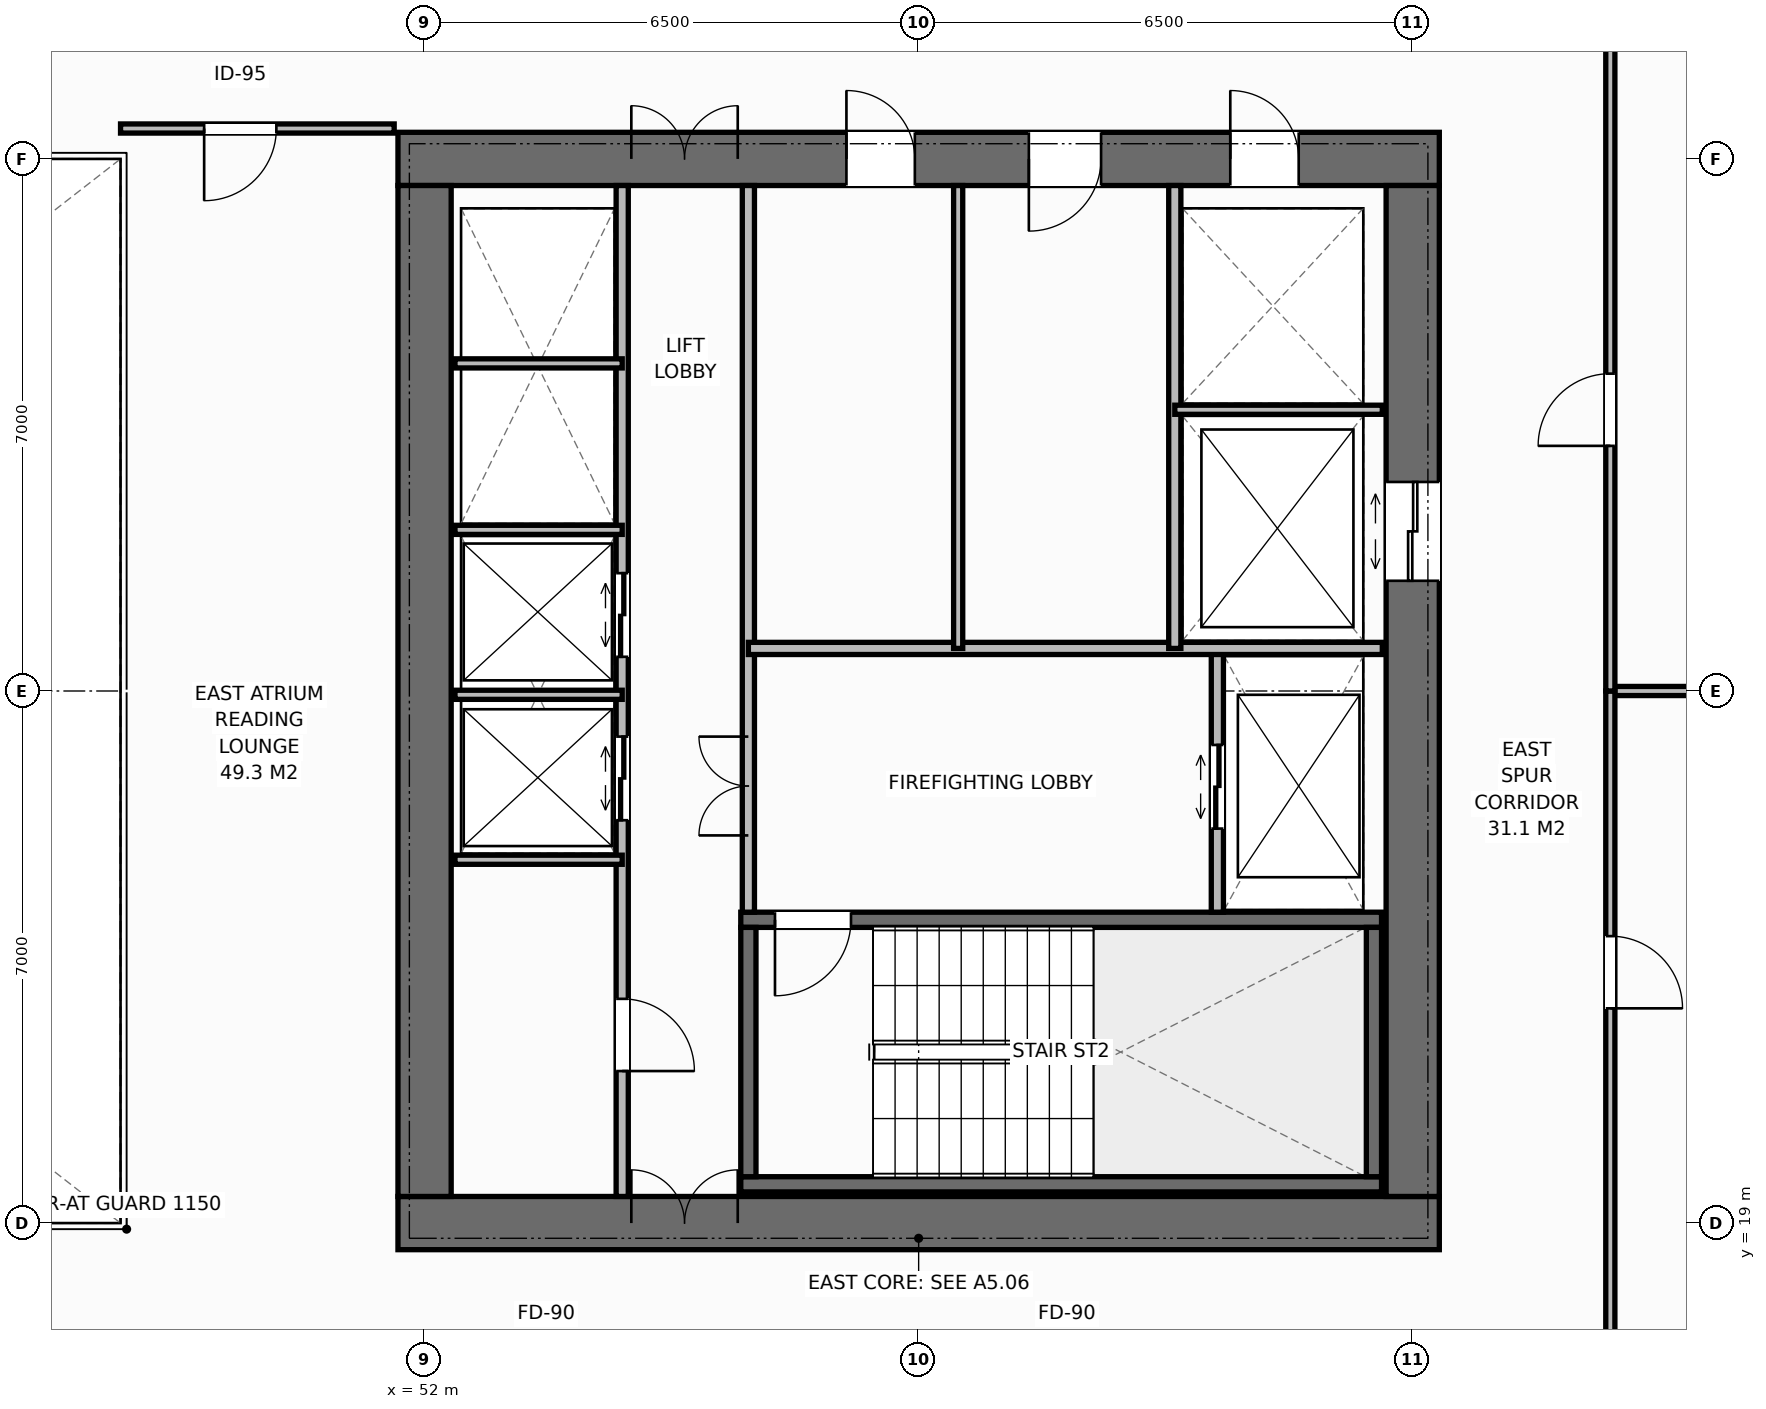
"""IFC4 building model, lengths in metres.
Left out: names, types, materials, properties, quantities, classifications, styles, units other than length and angle.
Written with IfcOpenShell. Run it as: python <this file> out.ifc"""

import sys

from ifc_helpers import new_model, si_unit, direction, frame, frame_2d, origin, place, context, subcontext, project, spatial, rectangle, extrude, element, fill, save


model = new_model("IFC4")
c1 = context("Model", 3, precision=1e-05, world=origin(), true_north=direction((0.0, 1.0)))
c2 = subcontext(c1, "Body", "Model", "MODEL_VIEW")
j1 = project(units=[si_unit("LENGTHUNIT", "METRE"), si_unit("PLANEANGLEUNIT", "RADIAN")], contexts=[c1])
p1 = place(None, origin())
s1 = spatial("IfcSite", under=j1, at=p1, CompositionType="ELEMENT")
p2 = place(p1, origin())
s2 = spatial("IfcBuilding", under=s1, at=p2, CompositionType="ELEMENT")
p3 = place(p2, frame((0.0, 0.0, 97.4)))
s3 = spatial("IfcBuildingStorey", under=s2, at=p3, CompositionType="ELEMENT", Elevation=97.4)
p4 = place(p3, frame((51.65, 19.0, 0.0), z_axis=(0.0, 0.0, 1.0), x_axis=(1.0, 0.0, 0.0)))
e1 = element("IfcWall", 1, at=p4, inside=s3, PredefinedType="SHEAR", context=c2, shape_type="SweptSolid", body=[
    extrude(rectangle(XDim=13.7, YDim=0.7, at=frame_2d((6.85, 0.0))), origin(), (0.0, 0.0, 1.0), 3.8),
])
p5 = place(p4, frame((3.07, 0.0, 0.0)))
e2 = element("IfcOpeningElement", 2, at=p5, cuts=e1, PredefinedType="OPENING", context=c2, shape_type="SweptSolid", body=[
    extrude(rectangle(XDim=1.4, YDim=2.2, at=frame_2d((0.7, 1.1))), frame((0.0, 0.36, 0.0), z_axis=(0.0, -1.0, 0.0), x_axis=(1.0, 0.0, 0.0)), (0.0, 0.0, 1.0), 0.72),
])
p6 = place(p3, frame((51.65, 33.0, 0.0), z_axis=(0.0, 0.0, 1.0), x_axis=(1.0, 0.0, 0.0)))
e3 = element("IfcWall", 3, at=p6, inside=s3, PredefinedType="SHEAR", context=c2, shape_type="SweptSolid", body=[
    extrude(rectangle(XDim=13.7, YDim=0.7, at=frame_2d((6.85, 0.0))), origin(), (0.0, 0.0, 1.0), 3.8),
])
p7 = place(p6, frame((3.07, 0.0, 0.0)))
e4 = element("IfcOpeningElement", 4, at=p7, cuts=e3, PredefinedType="OPENING", context=c2, shape_type="SweptSolid", body=[
    extrude(rectangle(XDim=1.4, YDim=2.2, at=frame_2d((0.7, 1.1))), frame((0.0, 0.36, 0.0), z_axis=(0.0, -1.0, 0.0), x_axis=(1.0, 0.0, 0.0)), (0.0, 0.0, 1.0), 0.72),
])
p8 = place(p6, frame((10.95, 0.0, 0.0)))
e5 = element("IfcOpeningElement", 5, at=p8, cuts=e3, PredefinedType="OPENING", context=c2, shape_type="SweptSolid", body=[
    extrude(rectangle(XDim=0.9, YDim=2.15, at=frame_2d((0.45, 1.075))), frame((0.0, 0.36, 0.0), z_axis=(0.0, -1.0, 0.0), x_axis=(1.0, 0.0, 0.0)), (0.0, 0.0, 1.0), 0.72),
])
p9 = place(p6, frame((5.9, 0.0, 0.0)))
e6 = element("IfcOpeningElement", 6, at=p9, cuts=e3, PredefinedType="OPENING", context=c2, shape_type="SweptSolid", body=[
    extrude(rectangle(XDim=0.9, YDim=2.15, at=frame_2d((0.45, 1.075))), frame((0.0, 0.36, 0.0), z_axis=(0.0, -1.0, 0.0), x_axis=(1.0, 0.0, 0.0)), (0.0, 0.0, 1.0), 0.72),
])
p10 = place(p6, frame((8.3, 0.0, 0.0)))
e7 = element("IfcOpeningElement", 7, at=p10, cuts=e3, PredefinedType="OPENING", context=c2, shape_type="SweptSolid", body=[
    extrude(rectangle(XDim=0.95, YDim=2.15, at=frame_2d((0.475, 1.075))), frame((0.0, 0.36, 0.0), z_axis=(0.0, -1.0, 0.0), x_axis=(1.0, 0.0, 0.0)), (0.0, 0.0, 1.0), 0.72),
])
p11 = place(p3, frame((52.0, 19.35, 0.0), z_axis=(0.0, 0.0, 1.0), x_axis=(0.0, 1.0, 0.0)))
e8 = element("IfcWall", 8, at=p11, inside=s3, PredefinedType="SHEAR", context=c2, shape_type="SweptSolid", body=[
    extrude(rectangle(XDim=13.3, YDim=0.7, at=frame_2d((6.65, 0.0))), origin(), (0.0, 0.0, 1.0), 3.8),
])
p12 = place(p3, frame((65.0, 19.35, 0.0), z_axis=(0.0, 0.0, 1.0), x_axis=(0.0, 1.0, 0.0)))
e9 = element("IfcWall", 9, at=p12, inside=s3, PredefinedType="SHEAR", context=c2, shape_type="SweptSolid", body=[
    extrude(rectangle(XDim=13.3, YDim=0.7, at=frame_2d((6.65, 0.0))), origin(), (0.0, 0.0, 1.0), 3.8),
])
p13 = place(p12, frame((8.1, 0.0, 0.0)))
e10 = element("IfcOpeningElement", 10, at=p13, cuts=e9, PredefinedType="OPENING", context=c2, shape_type="SweptSolid", body=[
    extrude(rectangle(XDim=1.3, YDim=2.2, at=frame_2d((0.65, 1.1))), frame((0.0, 0.36, 0.0), z_axis=(0.0, -1.0, 0.0), x_axis=(1.0, 0.0, 0.0)), (0.0, 0.0, 1.0), 0.72),
])
p14 = place(p3, frame((56.16, 19.51, 0.0), z_axis=(0.0, 0.0, 1.0), x_axis=(1.0, 0.0, 0.0)))
e11 = element("IfcWall", 11, at=p14, inside=s3, PredefinedType="SHEAR", context=c2, shape_type="SweptSolid", body=[
    extrude(rectangle(XDim=8.43, YDim=0.2, at=frame_2d((4.215, 0.0))), origin(), (0.0, 0.0, 1.0), 3.8),
])
p15 = place(p3, frame((56.16, 22.99, 0.0), z_axis=(0.0, 0.0, 1.0), x_axis=(1.0, 0.0, 0.0)))
e12 = element("IfcWall", 12, at=p15, inside=s3, PredefinedType="SHEAR", context=c2, shape_type="SweptSolid", body=[
    extrude(rectangle(XDim=8.43, YDim=0.2, at=frame_2d((4.215, 0.0))), origin(), (0.0, 0.0, 1.0), 3.8),
])
p16 = place(p15, frame((0.45, 0.0, 0.0)))
e13 = element("IfcOpeningElement", 13, at=p16, cuts=e12, PredefinedType="OPENING", context=c2, shape_type="SweptSolid", body=[
    extrude(rectangle(XDim=1.0, YDim=2.15, at=frame_2d((0.5, 1.075))), frame((0.0, 0.11, 0.0), z_axis=(0.0, -1.0, 0.0), x_axis=(1.0, 0.0, 0.0)), (0.0, 0.0, 1.0), 0.22),
])
for number, where, z_axis, x_axis in (
    (14, (56.26, 19.61, 0.0), (0.0, 0.0, 1.0), (0.0, 1.0, 0.0)),
    (15, (64.49, 19.61, 0.0), (0.0, 0.0, 1.0), (0.0, 1.0, 0.0)),
):
    element("IfcWall", number, at=place(p3, frame(where, z_axis=z_axis, x_axis=x_axis)), inside=s3, PredefinedType="SHEAR", context=c2, shape_type="SweptSolid", body=[
        extrude(rectangle(XDim=3.28, YDim=0.2, at=frame_2d((1.64, 0.0))), origin(), (0.0, 0.0, 1.0), 3.8),
    ])
p17 = place(p3, frame((54.6, 19.35, 0.0), z_axis=(0.0, 0.0, 1.0), x_axis=(0.0, 1.0, 0.0)))
e16 = element("IfcWall", 16, at=p17, inside=s3, PredefinedType="STANDARD", context=c2, shape_type="SweptSolid", body=[
    extrude(rectangle(XDim=13.3, YDim=0.16, at=frame_2d((6.65, 0.0))), origin(), (0.0, 0.0, 1.0), 3.565),
])
p18 = place(p17, frame((1.65, 0.0, 0.0)))
e17 = element("IfcOpeningElement", 17, at=p18, cuts=e16, PredefinedType="OPENING", context=c2, shape_type="SweptSolid", body=[
    extrude(rectangle(XDim=0.95, YDim=2.15, at=frame_2d((0.475, 1.075))), frame((0.0, 0.09, 0.0), z_axis=(0.0, -1.0, 0.0), x_axis=(1.0, 0.0, 0.0)), (0.0, 0.0, 1.0), 0.18),
])
p19 = place(p17, frame((4.95, 0.0, 0.0)))
e18 = element("IfcOpeningElement", 18, at=p19, cuts=e16, PredefinedType="OPENING", context=c2, shape_type="SweptSolid", body=[
    extrude(rectangle(XDim=1.1, YDim=2.2, at=frame_2d((0.55, 1.1))), frame((0.0, 0.09, 0.0), z_axis=(0.0, -1.0, 0.0), x_axis=(1.0, 0.0, 0.0)), (0.0, 0.0, 1.0), 0.18),
])
p20 = place(p17, frame((7.1, 0.0, 0.0)))
e19 = element("IfcOpeningElement", 19, at=p20, cuts=e16, PredefinedType="OPENING", context=c2, shape_type="SweptSolid", body=[
    extrude(rectangle(XDim=1.1, YDim=2.2, at=frame_2d((0.55, 1.1))), frame((0.0, 0.09, 0.0), z_axis=(0.0, -1.0, 0.0), x_axis=(1.0, 0.0, 0.0)), (0.0, 0.0, 1.0), 0.18),
])
p21 = place(p3, frame((56.26, 23.09, 0.0), z_axis=(0.0, 0.0, 1.0), x_axis=(0.0, 1.0, 0.0)))
e20 = element("IfcWall", 20, at=p21, inside=s3, PredefinedType="STANDARD", context=c2, shape_type="SweptSolid", body=[
    extrude(rectangle(XDim=9.56, YDim=0.16, at=frame_2d((4.78, 0.0))), origin(), (0.0, 0.0, 1.0), 3.565),
])
p22 = place(p21, frame((1.01, 0.0, 0.0)))
e21 = element("IfcOpeningElement", 21, at=p22, cuts=e20, PredefinedType="OPENING", context=c2, shape_type="SweptSolid", body=[
    extrude(rectangle(XDim=1.3, YDim=2.2, at=frame_2d((0.65, 1.1))), frame((0.0, 0.09, 0.0), z_axis=(0.0, -1.0, 0.0), x_axis=(1.0, 0.0, 0.0)), (0.0, 0.0, 1.0), 0.18),
])
for number, where, z_axis, x_axis in (
    (22, (52.4, 23.78, 0.0), (0.0, 0.0, 1.0), (1.0, 0.0, 0.0)),
    (23, (52.4, 25.95, 0.0), (0.0, 0.0, 1.0), (1.0, 0.0, 0.0)),
    (24, (52.4, 28.12, 0.0), (0.0, 0.0, 1.0), (1.0, 0.0, 0.0)),
    (25, (52.4, 30.31, 0.0), (0.0, 0.0, 1.0), (1.0, 0.0, 0.0)),
):
    element("IfcWall", number, at=place(p3, frame(where, z_axis=z_axis, x_axis=x_axis)), inside=s3, PredefinedType="PARTITIONING", context=c2, shape_type="SweptSolid", body=[
        extrude(rectangle(XDim=2.2, YDim=0.12, at=frame_2d((1.1, 0.0))), origin(), (0.0, 0.0, 1.0), 3.565),
    ])
p23 = place(p3, frame((62.43, 23.09, 0.0), z_axis=(0.0, 0.0, 1.0), x_axis=(0.0, 1.0, 0.0)))
e26 = element("IfcWall", 26, at=p23, inside=s3, PredefinedType="STANDARD", context=c2, shape_type="SweptSolid", body=[
    extrude(rectangle(XDim=3.47, YDim=0.16, at=frame_2d((1.735, 0.0))), origin(), (0.0, 0.0, 1.0), 3.565),
])
p24 = place(p23, frame((1.1, 0.0, 0.0)))
e27 = element("IfcOpeningElement", 27, at=p24, cuts=e26, PredefinedType="OPENING", context=c2, shape_type="SweptSolid", body=[
    extrude(rectangle(XDim=1.1, YDim=2.2, at=frame_2d((0.55, 1.1))), frame((0.0, 0.09, 0.0), z_axis=(0.0, -1.0, 0.0), x_axis=(1.0, 0.0, 0.0)), (0.0, 0.0, 1.0), 0.18),
])
p25 = place(p3, frame((56.26, 26.56, 0.0), z_axis=(0.0, 0.0, 1.0), x_axis=(1.0, 0.0, 0.0)))
e28 = element("IfcWall", 28, at=p25, inside=s3, PredefinedType="STANDARD", context=c2, shape_type="SweptSolid", body=[
    extrude(rectangle(XDim=8.34, YDim=0.16, at=frame_2d((4.17, 0.0))), origin(), (0.0, 0.0, 1.0), 3.565),
])
p26 = place(p3, frame((61.87, 26.56, 0.0), z_axis=(0.0, 0.0, 1.0), x_axis=(0.0, 1.0, 0.0)))
e29 = element("IfcWall", 29, at=p26, inside=s3, PredefinedType="STANDARD", context=c2, shape_type="SweptSolid", body=[
    extrude(rectangle(XDim=6.09, YDim=0.16, at=frame_2d((3.045, 0.0))), origin(), (0.0, 0.0, 1.0), 3.565),
])
p27 = place(p3, frame((61.87, 29.7, 0.0), z_axis=(0.0, 0.0, 1.0), x_axis=(1.0, 0.0, 0.0)))
e30 = element("IfcWall", 30, at=p27, inside=s3, PredefinedType="PARTITIONING", context=c2, shape_type="SweptSolid", body=[
    extrude(rectangle(XDim=2.73, YDim=0.12, at=frame_2d((1.365, 0.0))), origin(), (0.0, 0.0, 1.0), 3.565),
])
p28 = place(p3, frame((59.02, 26.56, 0.0), z_axis=(0.0, 0.0, 1.0), x_axis=(0.0, 1.0, 0.0)))
e31 = element("IfcWall", 31, at=p28, inside=s3, PredefinedType="PARTITIONING", context=c2, shape_type="SweptSolid", body=[
    extrude(rectangle(XDim=6.09, YDim=0.12, at=frame_2d((3.045, 0.0))), origin(), (0.0, 0.0, 1.0), 3.565),
])
p29 = place(p3, frame((48.0, 33.4, 0.0), z_axis=(0.0, 0.0, 1.0), x_axis=(1.0, 0.0, 0.0)))
e32 = element("IfcWall", 32, at=p29, inside=s3, PredefinedType="PARTITIONING", context=c2, shape_type="SweptSolid", body=[
    extrude(rectangle(XDim=3.6, YDim=0.12, at=frame_2d((1.8, 0.0))), origin(), (0.0, 0.0, 1.0), 3.565),
])
p30 = place(p29, frame((1.1, 0.0, 0.0)))
e33 = element("IfcOpeningElement", 33, at=p30, cuts=e32, PredefinedType="OPENING", context=c2, shape_type="SweptSolid", body=[
    extrude(rectangle(XDim=0.95, YDim=2.15, at=frame_2d((0.475, 1.075))), frame((0.0, 0.07, 0.0), z_axis=(0.0, -1.0, 0.0), x_axis=(1.0, 0.0, 0.0)), (0.0, 0.0, 1.0), 0.14),
])
p31 = place(p3, frame((67.6, 26.0, 0.0), z_axis=(0.0, 0.0, 1.0), x_axis=(1.0, 0.0, 0.0)))
e34 = element("IfcWall", 34, at=p31, inside=s3, PredefinedType="PARTITIONING", context=c2, shape_type="SweptSolid", body=[
    extrude(rectangle(XDim=8.58, YDim=0.12, at=frame_2d((4.29, 0.0))), origin(), (0.0, 0.0, 1.0), 3.565),
])
p32 = place(p3, frame((67.6, 16.5, 0.0), z_axis=(0.0, 0.0, 1.0), x_axis=(0.0, 1.0, 0.0)))
e35 = element("IfcWall", 35, at=p32, inside=s3, PredefinedType="PARTITIONING", context=c2, shape_type="SweptSolid", body=[
    extrude(rectangle(XDim=9.5, YDim=0.12, at=frame_2d((4.75, 0.0))), origin(), (0.0, 0.0, 1.0), 3.565),
])
p33 = place(p32, frame((5.325, 0.0, 0.0)))
e36 = element("IfcOpeningElement", 36, at=p33, cuts=e35, PredefinedType="OPENING", context=c2, shape_type="SweptSolid", body=[
    extrude(rectangle(XDim=0.95, YDim=2.15, at=frame_2d((0.475, 1.075))), frame((0.0, 0.07, 0.0), z_axis=(0.0, -1.0, 0.0), x_axis=(1.0, 0.0, 0.0)), (0.0, 0.0, 1.0), 0.14),
])
p34 = place(p3, frame((67.6, 26.0, 0.0), z_axis=(0.0, 0.0, 1.0), x_axis=(0.0, 1.0, 0.0)))
e37 = element("IfcWall", 37, at=p34, inside=s3, PredefinedType="PARTITIONING", context=c2, shape_type="SweptSolid", body=[
    extrude(rectangle(XDim=9.5, YDim=0.12, at=frame_2d((4.75, 0.0))), origin(), (0.0, 0.0, 1.0), 3.565),
])
p35 = place(p34, frame((3.225, 0.0, 0.0)))
e38 = element("IfcOpeningElement", 38, at=p35, cuts=e37, PredefinedType="OPENING", context=c2, shape_type="SweptSolid", body=[
    extrude(rectangle(XDim=0.95, YDim=2.15, at=frame_2d((0.475, 1.075))), frame((0.0, 0.07, 0.0), z_axis=(0.0, -1.0, 0.0), x_axis=(1.0, 0.0, 0.0)), (0.0, 0.0, 1.0), 0.14),
])
p36 = place(p5, origin())
e39 = element("IfcDoor", 39, at=p36, inside=s3, OperationType="DOUBLE_DOOR_SINGLE_SWING", PredefinedType="DOOR", context=c2, shape_type="SweptSolid", body=[
    extrude(rectangle(XDim=1.4, YDim=2.2, at=frame_2d((0.7, 1.1))), frame((0.0, 0.125, 0.0), z_axis=(0.0, -1.0, 0.0), x_axis=(1.0, 0.0, 0.0)), (0.0, 0.0, 1.0), 0.05),
])
fill(e2, e39)
p37 = place(p7, origin())
e40 = element("IfcDoor", 40, at=p37, inside=s3, OperationType="DOUBLE_DOOR_SINGLE_SWING", PredefinedType="DOOR", context=c2, shape_type="SweptSolid", body=[
    extrude(rectangle(XDim=1.4, YDim=2.2, at=frame_2d((0.7, 1.1))), frame((0.0, -0.075, 0.0), z_axis=(0.0, -1.0, 0.0), x_axis=(1.0, 0.0, 0.0)), (0.0, 0.0, 1.0), 0.05),
])
fill(e4, e40)
p38 = place(p18, origin())
e41 = element("IfcDoor", 41, at=p38, inside=s3, OperationType="SINGLE_SWING_RIGHT", PredefinedType="DOOR", context=c2, shape_type="SweptSolid", body=[
    extrude(rectangle(XDim=0.95, YDim=2.15, at=frame_2d((0.475, 1.075))), frame((0.0, 0.025, 0.0), z_axis=(0.0, -1.0, 0.0), x_axis=(1.0, 0.0, 0.0)), (0.0, 0.0, 1.0), 0.05),
])
fill(e17, e41)
p39 = place(p19, origin())
e42 = element("IfcDoor", 42, at=p39, inside=s3, OperationType="DOUBLE_DOOR_SLIDING", PredefinedType="DOOR", context=c2, shape_type="SweptSolid", body=[
    extrude(rectangle(XDim=1.1, YDim=2.2, at=frame_2d((0.55, 1.1))), frame((0.0, 0.025, 0.0), z_axis=(0.0, -1.0, 0.0), x_axis=(1.0, 0.0, 0.0)), (0.0, 0.0, 1.0), 0.05),
])
fill(e18, e42)
p40 = place(p20, origin())
e43 = element("IfcDoor", 43, at=p40, inside=s3, OperationType="DOUBLE_DOOR_SLIDING", PredefinedType="DOOR", context=c2, shape_type="SweptSolid", body=[
    extrude(rectangle(XDim=1.1, YDim=2.2, at=frame_2d((0.55, 1.1))), frame((0.0, 0.025, 0.0), z_axis=(0.0, -1.0, 0.0), x_axis=(1.0, 0.0, 0.0)), (0.0, 0.0, 1.0), 0.05),
])
fill(e19, e43)
p41 = place(p16, origin())
e44 = element("IfcDoor", 44, at=p41, inside=s3, OperationType="SINGLE_SWING_RIGHT", PredefinedType="DOOR", context=c2, shape_type="SweptSolid", body=[
    extrude(rectangle(XDim=1.0, YDim=2.15, at=frame_2d((0.5, 1.075))), frame((0.0, 0.025, 0.0), z_axis=(0.0, -1.0, 0.0), x_axis=(1.0, 0.0, 0.0)), (0.0, 0.0, 1.0), 0.05),
])
fill(e13, e44)
p42 = place(p24, origin())
e45 = element("IfcDoor", 45, at=p42, inside=s3, OperationType="DOUBLE_DOOR_SLIDING", PredefinedType="DOOR", context=c2, shape_type="SweptSolid", body=[
    extrude(rectangle(XDim=1.1, YDim=2.2, at=frame_2d((0.55, 1.1))), frame((0.0, 0.025, 0.0), z_axis=(0.0, -1.0, 0.0), x_axis=(1.0, 0.0, 0.0)), (0.0, 0.0, 1.0), 0.05),
])
fill(e27, e45)
p43 = place(p22, origin())
e46 = element("IfcDoor", 46, at=p43, inside=s3, OperationType="DOUBLE_DOOR_SINGLE_SWING", PredefinedType="DOOR", context=c2, shape_type="SweptSolid", body=[
    extrude(rectangle(XDim=1.3, YDim=2.2, at=frame_2d((0.65, 1.1))), frame((0.0, 0.025, 0.0), z_axis=(0.0, -1.0, 0.0), x_axis=(1.0, 0.0, 0.0)), (0.0, 0.0, 1.0), 0.05),
])
fill(e21, e46)
p44 = place(p13, origin())
e47 = element("IfcDoor", 47, at=p44, inside=s3, OperationType="DOUBLE_DOOR_SLIDING", PredefinedType="DOOR", context=c2, shape_type="SweptSolid", body=[
    extrude(rectangle(XDim=1.3, YDim=2.2, at=frame_2d((0.65, 1.1))), frame((0.0, 0.025, 0.0), z_axis=(0.0, -1.0, 0.0), x_axis=(1.0, 0.0, 0.0)), (0.0, 0.0, 1.0), 0.05),
])
fill(e10, e47)
p45 = place(p8, origin())
e48 = element("IfcDoor", 48, at=p45, inside=s3, OperationType="SINGLE_SWING_LEFT", PredefinedType="DOOR", context=c2, shape_type="SweptSolid", body=[
    extrude(rectangle(XDim=0.9, YDim=2.15, at=frame_2d((0.45, 1.075))), frame((0.0, -0.075, 0.0), z_axis=(0.0, -1.0, 0.0), x_axis=(1.0, 0.0, 0.0)), (0.0, 0.0, 1.0), 0.05),
])
fill(e5, e48)
p46 = place(p9, origin())
e49 = element("IfcDoor", 49, at=p46, inside=s3, OperationType="SINGLE_SWING_LEFT", PredefinedType="DOOR", context=c2, shape_type="SweptSolid", body=[
    extrude(rectangle(XDim=0.9, YDim=2.15, at=frame_2d((0.45, 1.075))), frame((0.0, -0.075, 0.0), z_axis=(0.0, -1.0, 0.0), x_axis=(1.0, 0.0, 0.0)), (0.0, 0.0, 1.0), 0.05),
])
fill(e6, e49)
p47 = place(p10, origin())
e50 = element("IfcDoor", 50, at=p47, inside=s3, OperationType="SINGLE_SWING_RIGHT", PredefinedType="DOOR", context=c2, shape_type="SweptSolid", body=[
    extrude(rectangle(XDim=0.95, YDim=2.15, at=frame_2d((0.475, 1.075))), frame((0.0, -0.075, 0.0), z_axis=(0.0, -1.0, 0.0), x_axis=(1.0, 0.0, 0.0)), (0.0, 0.0, 1.0), 0.05),
])
fill(e7, e50)
p48 = place(p30, origin())
e51 = element("IfcDoor", 51, at=p48, inside=s3, OperationType="SINGLE_SWING_RIGHT", PredefinedType="DOOR", context=c2, shape_type="SweptSolid", body=[
    extrude(rectangle(XDim=0.95, YDim=2.15, at=frame_2d((0.475, 1.075))), frame((0.0, 0.025, 0.0), z_axis=(0.0, -1.0, 0.0), x_axis=(1.0, 0.0, 0.0)), (0.0, 0.0, 1.0), 0.05),
])
fill(e33, e51)
p49 = place(p33, origin())
e52 = element("IfcDoor", 52, at=p49, inside=s3, OperationType="SINGLE_SWING_RIGHT", PredefinedType="DOOR", context=c2, shape_type="SweptSolid", body=[
    extrude(rectangle(XDim=0.95, YDim=2.15, at=frame_2d((0.475, 1.075))), frame((0.0, 0.025, 0.0), z_axis=(0.0, -1.0, 0.0), x_axis=(1.0, 0.0, 0.0)), (0.0, 0.0, 1.0), 0.05),
])
fill(e36, e52)
p50 = place(p35, origin())
e53 = element("IfcDoor", 53, at=p50, inside=s3, OperationType="SINGLE_SWING_LEFT", PredefinedType="DOOR", context=c2, shape_type="SweptSolid", body=[
    extrude(rectangle(XDim=0.95, YDim=2.15, at=frame_2d((0.475, 1.075))), frame((0.0, 0.025, 0.0), z_axis=(0.0, -1.0, 0.0), x_axis=(1.0, 0.0, 0.0)), (0.0, 0.0, 1.0), 0.05),
])
fill(e38, e53)
save(model, sys.argv[1])
